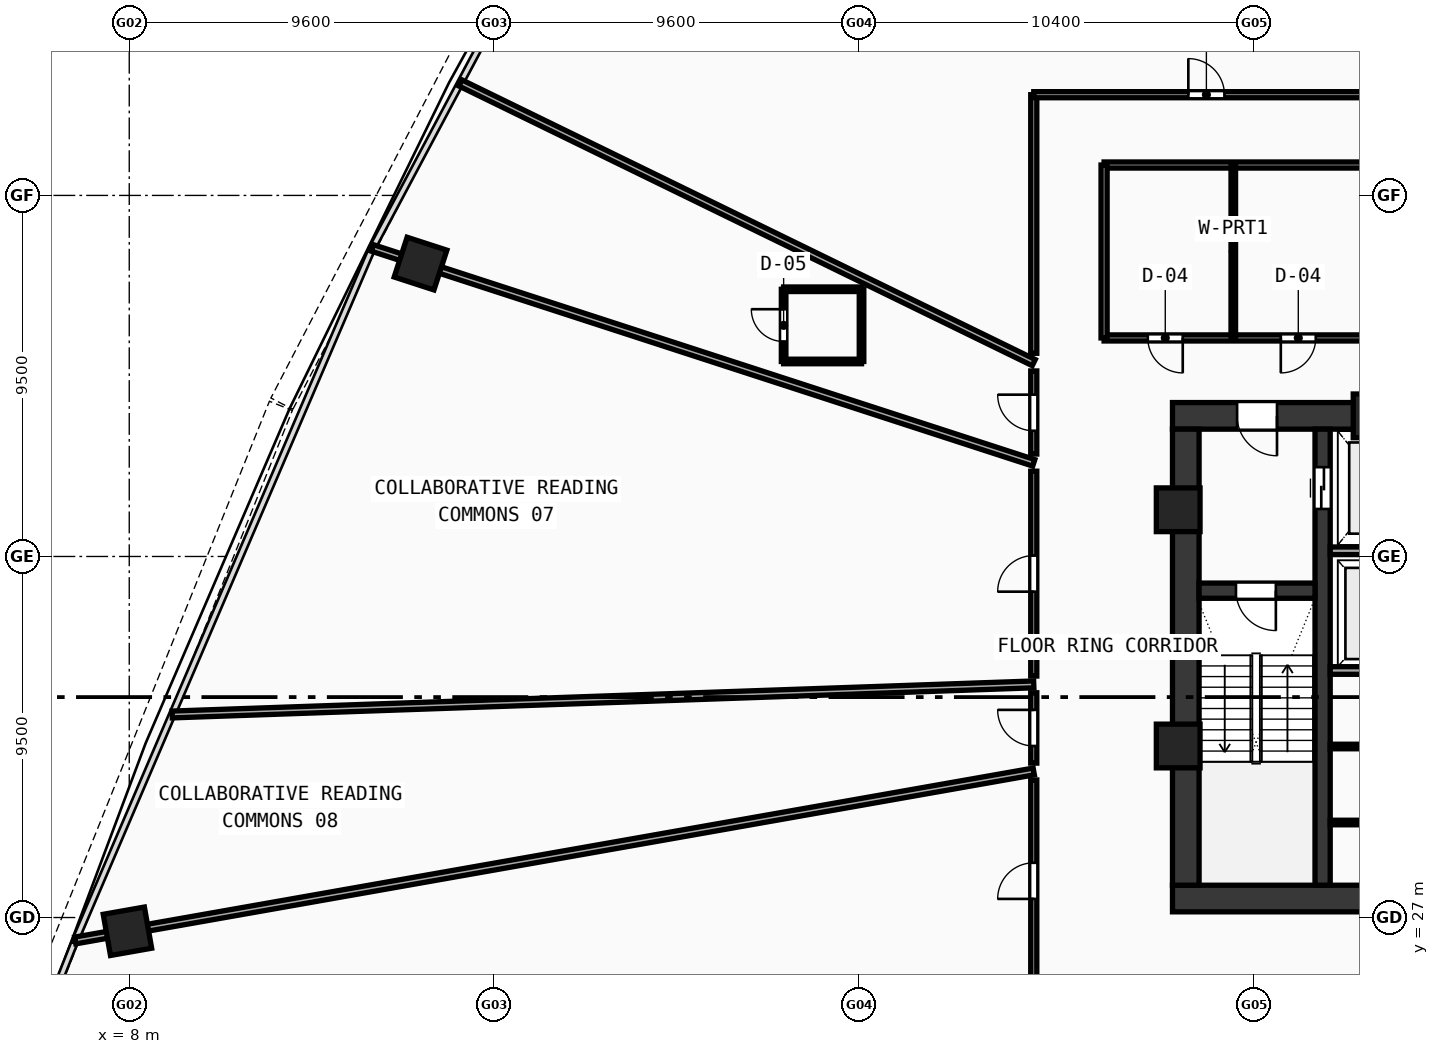
"""IFC4 building model, lengths in metres.
Left out: names, types, materials, properties, quantities, classifications, styles, units other than length and angle.
Written with IfcOpenShell. Run it as: python <this file> out.ifc"""

import sys

from ifc_helpers import new_model, si_unit, direction, frame, frame_2d, origin, origin_with_axes, origin_2d, place, context, subcontext, project, spatial, rectangle, hollow_rectangle, extrude, source, transform, mapped, element, fill, save


model = new_model("IFC4")
c1 = context("Model", 3, precision=1e-05, world=origin(), true_north=direction((0.0, 1.0)))
c2 = subcontext(c1, "Body", "Model", "MODEL_VIEW")
j1 = project(units=[si_unit("LENGTHUNIT", "METRE"), si_unit("PLANEANGLEUNIT", "RADIAN")], contexts=[c1])
p1 = place(None, origin())
s1 = spatial("IfcSite", under=j1, at=p1, CompositionType="ELEMENT")
p2 = place(p1, origin())
s2 = spatial("IfcBuilding", under=s1, at=p2, CompositionType="ELEMENT")
p3 = place(p2, frame((0.0, 0.0, 59.44)))
s3 = spatial("IfcBuildingStorey", under=s2, at=p3, CompositionType="ELEMENT", Elevation=59.44)
p4 = place(p3, frame((35.45, 27.5, 0.0), z_axis=(0.0, 0.0, 1.0), x_axis=(1.0, 0.0, 0.0)))
e1 = element("IfcWall", 1, at=p4, inside=s3, PredefinedType="SHEAR", context=c2, shape_type="SweptSolid", body=[
    extrude(rectangle(XDim=25.1, YDim=0.7, at=frame_2d((12.55, 0.0))), origin(), (0.0, 0.0, 1.0), 3.37),
])
p5 = place(p3, frame((35.45, 40.2, 0.0), z_axis=(0.0, 0.0, 1.0), x_axis=(1.0, 0.0, 0.0)))
e2 = element("IfcWall", 2, at=p5, inside=s3, PredefinedType="SHEAR", context=c2, shape_type="SweptSolid", body=[
    extrude(rectangle(XDim=11.35, YDim=0.7, at=frame_2d((5.675, 0.0))), origin(), (0.0, 0.0, 1.0), 3.37),
])
p6 = place(p5, frame((1.7, 0.0, 0.0)))
e3 = element("IfcOpeningElement", 3, at=p6, cuts=e2, PredefinedType="OPENING", context=c2, shape_type="SweptSolid", body=[
    extrude(rectangle(XDim=1.05, YDim=2.1, at=frame_2d((0.525, 1.05))), frame((0.0, 0.36, 0.0), z_axis=(0.0, -1.0, 0.0), x_axis=(1.0, 0.0, 0.0)), (0.0, 0.0, 1.0), 0.72),
])
p7 = place(p3, frame((35.8, 27.85, 0.0), z_axis=(0.0, 0.0, 1.0), x_axis=(0.0, 1.0, 0.0)))
e4 = element("IfcWall", 4, at=p7, inside=s3, PredefinedType="SHEAR", context=c2, shape_type="SweptSolid", body=[
    extrude(rectangle(XDim=12.0, YDim=0.7, at=frame_2d((6.0, 0.0))), origin(), (0.0, 0.0, 1.0), 3.37),
])
p8 = place(p3, frame((39.4, 27.85, 0.0), z_axis=(0.0, 0.0, 1.0), x_axis=(0.0, 1.0, 0.0)))
e5 = element("IfcWall", 5, at=p8, inside=s3, PredefinedType="SHEAR", context=c2, shape_type="SweptSolid", body=[
    extrude(rectangle(XDim=12.0, YDim=0.4, at=frame_2d((6.0, 0.0))), origin(), (0.0, 0.0, 1.0), 3.37),
])
p9 = place(p8, frame((9.9, 0.0, 0.0)))
e6 = element("IfcOpeningElement", 6, at=p9, cuts=e5, PredefinedType="OPENING", context=c2, shape_type="SweptSolid", body=[
    extrude(rectangle(XDim=1.1, YDim=2.1, at=frame_2d((0.55, 1.05))), frame((0.0, 0.21, 0.0), z_axis=(0.0, -1.0, 0.0), x_axis=(1.0, 0.0, 0.0)), (0.0, 0.0, 1.0), 0.42),
])
p10 = place(p3, frame((36.15, 35.6, 0.0), z_axis=(0.0, 0.0, 1.0), x_axis=(1.0, 0.0, 0.0)))
e7 = element("IfcWall", 7, at=p10, inside=s3, PredefinedType="SHEAR", context=c2, shape_type="SweptSolid", body=[
    extrude(rectangle(XDim=3.05, YDim=0.4, at=frame_2d((1.525, 0.0))), origin(), (0.0, 0.0, 1.0), 3.37),
])
p11 = place(p10, frame((0.97, 0.0, 0.0)))
e8 = element("IfcOpeningElement", 8, at=p11, cuts=e7, PredefinedType="OPENING", context=c2, shape_type="SweptSolid", body=[
    extrude(rectangle(XDim=1.05, YDim=2.1, at=frame_2d((0.525, 1.05))), frame((0.0, 0.21, 0.0), z_axis=(0.0, -1.0, 0.0), x_axis=(1.0, 0.0, 0.0)), (0.0, 0.0, 1.0), 0.42),
])
m1 = source(origin(), c2, "Body", "SweptSolid", [
    extrude(hollow_rectangle(XDim=1.15, YDim=1.15, WallThickness=0.048, at=origin_2d()), origin(), (0.0, 0.0, 1.0), 3.63),
])
for number, where, z_axis, x_axis in (
    (9, (40.781, 40.2, -0.26), (0.0, 0.0, 1.0), (1.0, 0.0, 0.0)),
    (10, (35.6, 37.729, -0.26), (0.0, 0.0, 1.0), (1.0, 0.0, 0.0)),
    (11, (35.6, 31.513, -0.26), (0.0, 0.0, 1.0), (1.0, 0.0, 0.0)),
):
    element("IfcColumn", number, at=place(p3, frame(where, z_axis=z_axis, x_axis=x_axis)), inside=s3, PredefinedType="COLUMN", context=c2, shape_type="MappedRepresentation", body=[
        mapped(m1, transform((0.0, 0.0, 0.0), scale=1.0)),
    ])
m2 = source(origin(), c2, "Body", "SweptSolid", [
    extrude(hollow_rectangle(XDim=1.1, YDim=1.1, WallThickness=0.045, at=origin_2d()), origin(), (0.0, 0.0, 1.0), 3.63),
])
for number, where, z_axis, x_axis in (
    (12, (15.665, 44.206, -0.26), (0.0, 0.0, 1.0), (-0.309, -0.951, 0.0)),
    (13, (7.952, 26.638, -0.26), (0.0, 0.0, 1.0), (0.174, -0.985, 0.0)),
):
    element("IfcColumn", number, at=place(p3, frame(where, z_axis=z_axis, x_axis=x_axis)), inside=s3, PredefinedType="COLUMN", context=c2, shape_type="MappedRepresentation", body=[
        mapped(m2, transform((0.0, 0.0, 0.0), scale=1.0)),
    ])
for number, where, z_axis, x_axis in (
    (14, (39.6, 36.65, 0.0), (0.0, 0.0, 1.0), (1.0, 0.0, 0.0)),
    (15, (39.6, 33.5, 0.0), (0.0, 0.0, 1.0), (1.0, 0.0, 0.0)),
):
    element("IfcWall", number, at=place(p3, frame(where, z_axis=z_axis, x_axis=x_axis)), inside=s3, PredefinedType="SOLIDWALL", context=c2, shape_type="SweptSolid", body=[
        extrude(rectangle(XDim=2.72, YDim=0.2, at=frame_2d((1.36, 0.0))), origin(), (0.0, 0.0, 1.0), 3.37),
    ])
for number, where, z_axis, x_axis in (
    (16, (39.6, 29.5, 0.0), (0.0, 0.0, 1.0), (1.0, 0.0, 0.0)),
    (17, (39.6, 31.5, 0.0), (0.0, 0.0, 1.0), (1.0, 0.0, 0.0)),
):
    element("IfcWall", number, at=place(p3, frame(where, z_axis=z_axis, x_axis=x_axis)), inside=s3, PredefinedType="PARTITIONING", context=c2, shape_type="SweptSolid", body=[
        extrude(rectangle(XDim=2.72, YDim=0.12, at=frame_2d((1.36, 0.0))), origin(), (0.0, 0.0, 1.0), 3.37),
    ])
p12 = place(p3, frame((33.65, 42.25, 0.0), z_axis=(0.0, 0.0, 1.0), x_axis=(1.0, 0.0, 0.0)))
e18 = element("IfcWall", 18, at=p12, inside=s3, PredefinedType="PARTITIONING", context=c2, shape_type="SweptSolid", body=[
    extrude(rectangle(XDim=10.23, YDim=0.16, at=frame_2d((5.115, 0.0))), origin(), (0.0, 0.0, 1.0), 2.67),
])
p13 = place(p12, frame((1.15, 0.0, 0.0)))
e19 = element("IfcOpeningElement", 19, at=p13, cuts=e18, PredefinedType="OPENING", context=c2, shape_type="SweptSolid", body=[
    extrude(rectangle(XDim=0.92, YDim=2.1, at=frame_2d((0.46, 1.05))), frame((0.0, 0.09, 0.0), z_axis=(0.0, -1.0, 0.0), x_axis=(1.0, 0.0, 0.0)), (0.0, 0.0, 1.0), 0.18),
])
p14 = place(p12, frame((4.65, 0.0, 0.0)))
e20 = element("IfcOpeningElement", 20, at=p14, cuts=e18, PredefinedType="OPENING", context=c2, shape_type="SweptSolid", body=[
    extrude(rectangle(XDim=0.92, YDim=2.1, at=frame_2d((0.46, 1.05))), frame((0.0, 0.09, 0.0), z_axis=(0.0, -1.0, 0.0), x_axis=(1.0, 0.0, 0.0)), (0.0, 0.0, 1.0), 0.18),
])
p15 = place(p3, frame((33.65, 46.8, 0.0), z_axis=(0.0, 0.0, 1.0), x_axis=(1.0, 0.0, 0.0)))
e21 = element("IfcWall", 21, at=p15, inside=s3, PredefinedType="PARTITIONING", context=c2, shape_type="SweptSolid", body=[
    extrude(rectangle(XDim=10.23, YDim=0.16, at=frame_2d((5.115, 0.0))), origin(), (0.0, 0.0, 1.0), 2.67),
])
p16 = place(p3, frame((33.65, 42.25, 0.0), z_axis=(0.0, 0.0, 1.0), x_axis=(0.0, 1.0, 0.0)))
e22 = element("IfcWall", 22, at=p16, inside=s3, PredefinedType="PARTITIONING", context=c2, shape_type="SweptSolid", body=[
    extrude(rectangle(XDim=4.55, YDim=0.16, at=frame_2d((2.275, 0.0))), origin(), (0.0, 0.0, 1.0), 2.67),
])
p17 = place(p3, frame((37.05, 42.25, 0.0), z_axis=(0.0, 0.0, 1.0), x_axis=(0.0, 1.0, 0.0)))
e23 = element("IfcWall", 23, at=p17, inside=s3, PredefinedType="PARTITIONING", context=c2, shape_type="SweptSolid", body=[
    extrude(rectangle(XDim=4.55, YDim=0.12, at=frame_2d((2.275, 0.0))), origin(), (0.0, 0.0, 1.0), 2.67),
])
p18 = place(p3, frame((41.344, 48.65, 0.0), z_axis=(0.0, 0.0, 1.0), x_axis=(-0.406729800422, 0.913548504158, 0.0)))
e24 = element("IfcWall", 24, at=p18, inside=s3, PredefinedType="PARTITIONING", context=c2, shape_type="SweptSolid", body=[
    extrude(rectangle(XDim=25.854, YDim=0.18, at=frame_2d((12.927, 0.0))), origin(), (0.0, 0.0, 1.0), 2.67),
])
p19 = place(p3, frame((31.8, 41.601, 0.0), z_axis=(0.0, 0.0, 1.0), x_axis=(-0.898795978277, 0.438367185625, 0.0)))
e25 = element("IfcWall", 25, at=p19, inside=s3, PredefinedType="PARTITIONING", context=c2, shape_type="SweptSolid", body=[
    extrude(rectangle(XDim=16.788, YDim=0.18, at=frame_2d((8.394, 0.0))), origin(), (0.0, 0.0, 1.0), 2.67),
])
p20 = place(p3, frame((31.8, 38.964, 0.0), z_axis=(0.0, 0.0, 1.0), x_axis=(-0.951052304058, 0.309029958006, 0.0)))
e26 = element("IfcWall", 26, at=p20, inside=s3, PredefinedType="PARTITIONING", context=c2, shape_type="SweptSolid", body=[
    extrude(rectangle(XDim=18.299, YDim=0.18, at=frame_2d((9.149, 0.0))), origin(), (0.0, 0.0, 1.0), 2.67),
])
p21 = place(p3, frame((31.8, 33.134, 0.0), z_axis=(0.0, 0.0, 1.0), x_axis=(-0.999390651746, -0.034904515515, 0.0)))
e27 = element("IfcWall", 27, at=p21, inside=s3, PredefinedType="PARTITIONING", context=c2, shape_type="SweptSolid", body=[
    extrude(rectangle(XDim=22.683, YDim=0.18, at=frame_2d((11.342, 0.0))), origin(), (0.0, 0.0, 1.0), 2.67),
])
p22 = place(p3, frame((31.8, 30.844, 0.0), z_axis=(0.0, 0.0, 1.0), x_axis=(-0.984808213418, -0.173645566555, 0.0)))
e28 = element("IfcWall", 28, at=p22, inside=s3, PredefinedType="PARTITIONING", context=c2, shape_type="SweptSolid", body=[
    extrude(rectangle(XDim=25.61, YDim=0.18, at=frame_2d((12.805, 0.0))), origin(), (0.0, 0.0, 1.0), 2.67),
])
p23 = place(p3, frame((31.8, 25.306, 0.0), z_axis=(0.0, 0.0, 1.0), x_axis=(0.0, 1.0, 0.0)))
e29 = element("IfcWall", 29, at=p23, inside=s3, PredefinedType="PARTITIONING", context=c2, shape_type="SweptSolid", body=[
    extrude(rectangle(XDim=5.314, YDim=0.16, at=frame_2d((2.657, 0.0))), origin(), (0.0, 0.0, 1.0), 2.97),
])
p24 = place(p23, frame((2.184, 0.0, 0.0)))
e30 = element("IfcOpeningElement", 30, at=p24, cuts=e29, PredefinedType="OPENING", context=c2, shape_type="SweptSolid", body=[
    extrude(rectangle(XDim=0.95, YDim=2.1, at=frame_2d((0.475, 1.05))), frame((0.0, 0.09, 0.0), z_axis=(0.0, -1.0, 0.0), x_axis=(1.0, 0.0, 0.0)), (0.0, 0.0, 1.0), 0.18),
])
p25 = place(p3, frame((31.8, 31.063, 0.0), z_axis=(0.0, 0.0, 1.0), x_axis=(0.0, 1.0, 0.0)))
e31 = element("IfcWall", 31, at=p25, inside=s3, PredefinedType="PARTITIONING", context=c2, shape_type="SweptSolid", body=[
    extrude(rectangle(XDim=1.851, YDim=0.16, at=frame_2d((0.926, 0.0))), origin(), (0.0, 0.0, 1.0), 3.37),
])
p26 = place(p25, frame((0.451, 0.0, 0.0)))
e32 = element("IfcOpeningElement", 32, at=p26, cuts=e31, PredefinedType="OPENING", context=c2, shape_type="SweptSolid", body=[
    extrude(rectangle(XDim=0.95, YDim=2.1, at=frame_2d((0.475, 1.05))), frame((0.0, 0.09, 0.0), z_axis=(0.0, -1.0, 0.0), x_axis=(1.0, 0.0, 0.0)), (0.0, 0.0, 1.0), 0.18),
])
p27 = place(p3, frame((31.8, 33.354, 0.0), z_axis=(0.0, 0.0, 1.0), x_axis=(0.0, 1.0, 0.0)))
e33 = element("IfcWall", 33, at=p27, inside=s3, PredefinedType="PARTITIONING", context=c2, shape_type="SweptSolid", body=[
    extrude(rectangle(XDim=5.39, YDim=0.16, at=frame_2d((2.695, 0.0))), origin(), (0.0, 0.0, 1.0), 3.37),
])
p28 = place(p27, frame((2.22, 0.0, 0.0)))
e34 = element("IfcOpeningElement", 34, at=p28, cuts=e33, PredefinedType="OPENING", context=c2, shape_type="SweptSolid", body=[
    extrude(rectangle(XDim=0.95, YDim=2.1, at=frame_2d((0.475, 1.05))), frame((0.0, 0.09, 0.0), z_axis=(0.0, -1.0, 0.0), x_axis=(1.0, 0.0, 0.0)), (0.0, 0.0, 1.0), 0.18),
])
p29 = place(p3, frame((31.8, 39.195, 0.0), z_axis=(0.0, 0.0, 1.0), x_axis=(0.0, 1.0, 0.0)))
e35 = element("IfcWall", 35, at=p29, inside=s3, PredefinedType="PARTITIONING", context=c2, shape_type="SweptSolid", body=[
    extrude(rectangle(XDim=2.187, YDim=0.16, at=frame_2d((1.093, 0.0))), origin(), (0.0, 0.0, 1.0), 3.37),
])
p30 = place(p29, frame((0.613, 0.0, 0.0)))
e36 = element("IfcOpeningElement", 36, at=p30, cuts=e35, PredefinedType="OPENING", context=c2, shape_type="SweptSolid", body=[
    extrude(rectangle(XDim=0.95, YDim=2.1, at=frame_2d((0.475, 1.05))), frame((0.0, 0.09, 0.0), z_axis=(0.0, -1.0, 0.0), x_axis=(1.0, 0.0, 0.0)), (0.0, 0.0, 1.0), 0.18),
])
p31 = place(p3, frame((31.8, 41.846, 0.0), z_axis=(0.0, 0.0, 1.0), x_axis=(0.0, 1.0, 0.0)))
e37 = element("IfcWall", 37, at=p31, inside=s3, PredefinedType="PARTITIONING", context=c2, shape_type="SweptSolid", body=[
    extrude(rectangle(XDim=6.804, YDim=0.16, at=frame_2d((3.402, 0.0))), origin(), (0.0, 0.0, 1.0), 2.67),
])
p32 = place(p3, frame((31.8, 48.65, 0.0), z_axis=(0.0, 0.0, 1.0), x_axis=(1.0, 0.0, 0.0)))
e38 = element("IfcWall", 38, at=p32, inside=s3, PredefinedType="PARTITIONING", context=c2, shape_type="SweptSolid", body=[
    extrude(rectangle(XDim=9.303, YDim=0.16, at=frame_2d((4.651, 0.0))), origin(), (0.0, 0.0, 1.0), 2.97),
])
p33 = place(p32, frame((4.067, 0.0, 0.0)))
e39 = element("IfcOpeningElement", 39, at=p33, cuts=e38, PredefinedType="OPENING", context=c2, shape_type="SweptSolid", body=[
    extrude(rectangle(XDim=0.95, YDim=2.1, at=frame_2d((0.475, 1.05))), frame((0.0, 0.09, 0.0), z_axis=(0.0, -1.0, 0.0), x_axis=(1.0, 0.0, 0.0)), (0.0, 0.0, 1.0), 0.18),
])
p34 = place(p3, frame((25.218, 41.631, 0.0), z_axis=(0.0, 0.0, 1.0), x_axis=(1.0, 0.0, 0.0)))
e40 = element("IfcWall", 40, at=p34, inside=s3, PredefinedType="PARTITIONING", context=c2, shape_type="SweptSolid", body=[
    extrude(rectangle(XDim=2.05, YDim=0.12, at=frame_2d((1.025, 0.0))), origin(), (0.0, 0.0, 1.0), 3.37),
])
p35 = place(p3, frame((27.268, 41.631, 0.0), z_axis=(0.0, 0.0, 1.0), x_axis=(0.0, 1.0, 0.0)))
e41 = element("IfcWall", 41, at=p35, inside=s3, PredefinedType="PARTITIONING", context=c2, shape_type="SweptSolid", body=[
    extrude(rectangle(XDim=1.9, YDim=0.12, at=frame_2d((0.95, 0.0))), origin(), (0.0, 0.0, 1.0), 3.37),
])
p36 = place(p3, frame((27.268, 43.531, 0.0), z_axis=(0.0, 0.0, 1.0), x_axis=(-1.0, 0.0, 0.0)))
e42 = element("IfcWall", 42, at=p36, inside=s3, PredefinedType="PARTITIONING", context=c2, shape_type="SweptSolid", body=[
    extrude(rectangle(XDim=2.05, YDim=0.12, at=frame_2d((1.025, 0.0))), origin(), (0.0, 0.0, 1.0), 3.37),
])
p37 = place(p3, frame((25.218, 43.531, 0.0), z_axis=(0.0, 0.0, 1.0), x_axis=(0.0, -1.0, 0.0)))
e43 = element("IfcWall", 43, at=p37, inside=s3, PredefinedType="PARTITIONING", context=c2, shape_type="SweptSolid", body=[
    extrude(rectangle(XDim=1.9, YDim=0.12, at=frame_2d((0.95, 0.0))), origin(), (0.0, 0.0, 1.0), 3.37),
])
p38 = place(p37, frame((0.525, 0.0, 0.0)))
e44 = element("IfcOpeningElement", 44, at=p38, cuts=e43, PredefinedType="OPENING", context=c2, shape_type="SweptSolid", body=[
    extrude(rectangle(XDim=0.85, YDim=2.1, at=frame_2d((0.425, 1.05))), frame((0.0, 0.07, 0.0), z_axis=(0.0, -1.0, 0.0), x_axis=(1.0, 0.0, 0.0)), (0.0, 0.0, 1.0), 0.14),
])
m3 = source(origin(), c2, "Body", "SweptSolid", [
    extrude(rectangle(XDim=1.05, YDim=2.1, at=frame_2d((0.525, 1.05))), frame((0.0, 0.025, 0.0), z_axis=(0.0, -1.0, 0.0), x_axis=(1.0, 0.0, 0.0)), (0.0, 0.0, 1.0), 0.05),
])
p39 = place(p11, frame((1.05, 0.0, 0.0), z_axis=(0.0, 0.0, 1.0), x_axis=(-1.0, 0.0, 0.0)))
e45 = element("IfcDoor", 45, at=p39, inside=s3, OperationType="SINGLE_SWING_LEFT", PredefinedType="DOOR", context=c2, shape_type="MappedRepresentation", body=[
    mapped(m3, transform((0.0, 0.0, 0.0), scale=1.0)),
])
fill(e8, e45)
p40 = place(p6, frame((1.05, 0.0, 0.0), z_axis=(0.0, 0.0, 1.0), x_axis=(-1.0, 0.0, 0.0)))
e46 = element("IfcDoor", 46, at=p40, inside=s3, OperationType="SINGLE_SWING_LEFT", PredefinedType="DOOR", context=c2, shape_type="MappedRepresentation", body=[
    mapped(m3, transform((0.0, 0.0, 0.0), scale=1.0)),
])
fill(e3, e46)
m4 = source(origin(), c2, "Body", "SweptSolid", [
    extrude(rectangle(XDim=1.1, YDim=2.1, at=frame_2d((0.55, 1.05))), frame((0.0, 0.025, 0.0), z_axis=(0.0, -1.0, 0.0), x_axis=(1.0, 0.0, 0.0)), (0.0, 0.0, 1.0), 0.05),
])
p41 = place(p9, frame((1.1, 0.0, 0.0), z_axis=(0.0, 0.0, 1.0), x_axis=(-1.0, 0.0, 0.0)))
e47 = element("IfcDoor", 47, at=p41, inside=s3, OperationType="DOUBLE_DOOR_SLIDING", PredefinedType="DOOR", context=c2, shape_type="MappedRepresentation", body=[
    mapped(m4, transform((0.0, 0.0, 0.0), scale=1.0)),
])
fill(e6, e47)
m5 = source(origin(), c2, "Body", "SweptSolid", [
    extrude(rectangle(XDim=0.92, YDim=2.1, at=frame_2d((0.46, 1.05))), frame((0.0, 0.025, 0.0), z_axis=(0.0, -1.0, 0.0), x_axis=(1.0, 0.0, 0.0)), (0.0, 0.0, 1.0), 0.05),
])
p42 = place(p13, frame((0.92, 0.0, 0.0), z_axis=(0.0, 0.0, 1.0), x_axis=(-1.0, 0.0, 0.0)))
e48 = element("IfcDoor", 48, at=p42, inside=s3, OperationType="SINGLE_SWING_LEFT", PredefinedType="DOOR", context=c2, shape_type="MappedRepresentation", body=[
    mapped(m5, transform((0.0, 0.0, 0.0), scale=1.0)),
])
fill(e19, e48)
p43 = place(p14, frame((0.92, 0.0, 0.0), z_axis=(0.0, 0.0, 1.0), x_axis=(-1.0, 0.0, 0.0)))
e49 = element("IfcDoor", 49, at=p43, inside=s3, OperationType="SINGLE_SWING_RIGHT", PredefinedType="DOOR", context=c2, shape_type="MappedRepresentation", body=[
    mapped(m5, transform((0.0, 0.0, 0.0), scale=1.0)),
])
fill(e20, e49)
m6 = source(origin(), c2, "Body", "SweptSolid", [
    extrude(rectangle(XDim=0.95, YDim=2.1, at=frame_2d((0.475, 1.05))), frame((0.0, 0.025, 0.0), z_axis=(0.0, -1.0, 0.0), x_axis=(1.0, 0.0, 0.0)), (0.0, 0.0, 1.0), 0.05),
])
p44 = place(p33, origin_with_axes())
e50 = element("IfcDoor", 50, at=p44, inside=s3, OperationType="SINGLE_SWING_LEFT", PredefinedType="DOOR", context=c2, shape_type="MappedRepresentation", body=[
    mapped(m6, transform((0.0, 0.0, 0.0), scale=1.0)),
])
fill(e39, e50)
p45 = place(p30, origin_with_axes())
e51 = element("IfcDoor", 51, at=p45, inside=s3, OperationType="SINGLE_SWING_RIGHT", PredefinedType="DOOR", context=c2, shape_type="MappedRepresentation", body=[
    mapped(m6, transform((0.0, 0.0, 0.0), scale=1.0)),
])
fill(e36, e51)
m7 = source(origin(), c2, "Body", "SweptSolid", [
    extrude(rectangle(XDim=0.85, YDim=2.1, at=frame_2d((0.425, 1.05))), frame((0.0, 0.025, 0.0), z_axis=(0.0, -1.0, 0.0), x_axis=(1.0, 0.0, 0.0)), (0.0, 0.0, 1.0), 0.05),
])
p46 = place(p38, frame((0.85, 0.0, 0.0), z_axis=(0.0, 0.0, 1.0), x_axis=(-1.0, 0.0, 0.0)))
e52 = element("IfcDoor", 52, at=p46, inside=s3, OperationType="SINGLE_SWING_RIGHT", PredefinedType="DOOR", context=c2, shape_type="MappedRepresentation", body=[
    mapped(m7, transform((0.0, 0.0, 0.0), scale=1.0)),
])
fill(e44, e52)
p47 = place(p28, origin_with_axes())
e53 = element("IfcDoor", 53, at=p47, inside=s3, OperationType="SINGLE_SWING_LEFT", PredefinedType="DOOR", context=c2, shape_type="MappedRepresentation", body=[
    mapped(m6, transform((0.0, 0.0, 0.0), scale=1.0)),
])
fill(e34, e53)
p48 = place(p26, origin_with_axes())
e54 = element("IfcDoor", 54, at=p48, inside=s3, OperationType="SINGLE_SWING_RIGHT", PredefinedType="DOOR", context=c2, shape_type="MappedRepresentation", body=[
    mapped(m6, transform((0.0, 0.0, 0.0), scale=1.0)),
])
fill(e32, e54)
p49 = place(p24, origin_with_axes())
e55 = element("IfcDoor", 55, at=p49, inside=s3, OperationType="SINGLE_SWING_LEFT", PredefinedType="DOOR", context=c2, shape_type="MappedRepresentation", body=[
    mapped(m6, transform((0.0, 0.0, 0.0), scale=1.0)),
])
fill(e30, e55)
save(model, sys.argv[1])
